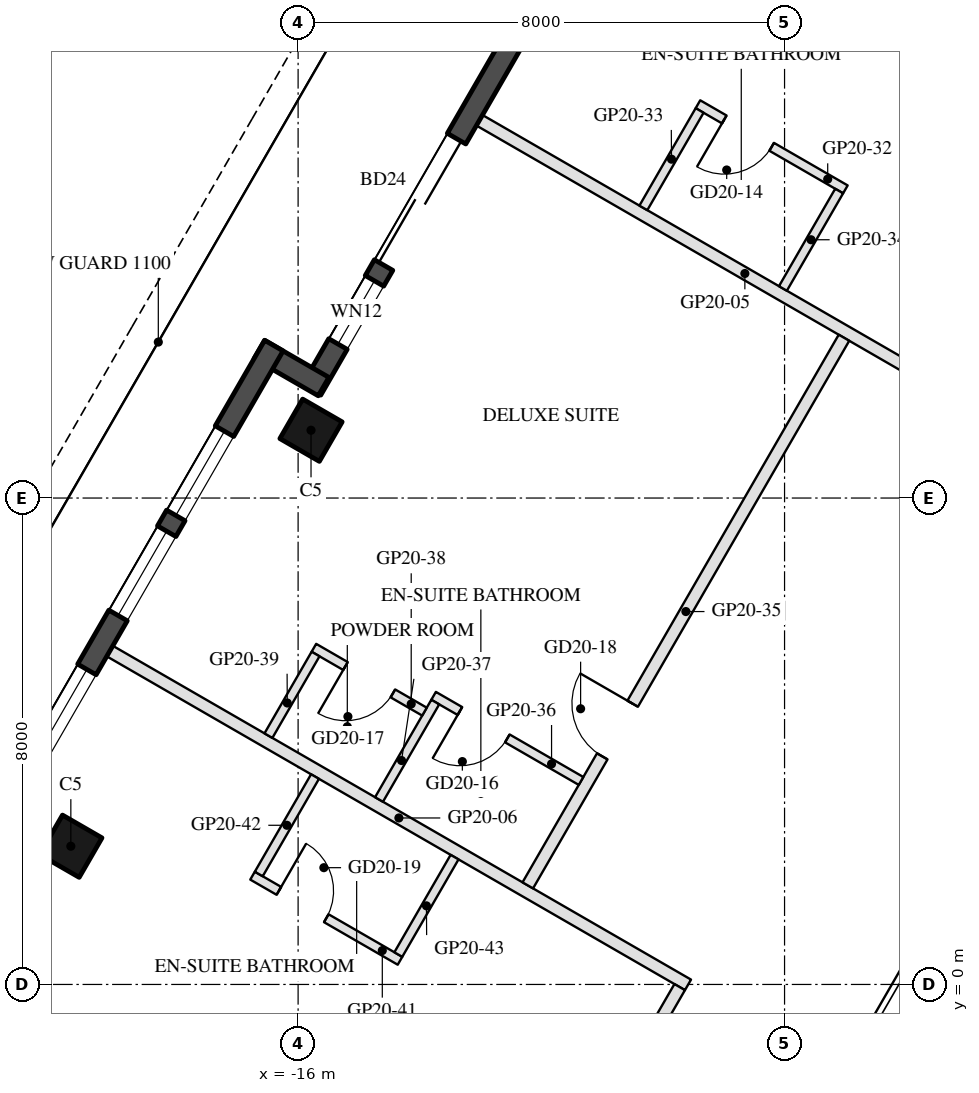
"""IFC4 building model, lengths in metres.
Left out: names, types, materials, properties, quantities, classifications, styles, units other than length and angle.
Written with IfcOpenShell. Run it as: python <this file> out.ifc"""

import sys

from ifc_helpers import new_model, si_unit, direction, frame, frame_2d, origin, origin_2d, place, context, subcontext, project, spatial, rectangle, hollow_rectangle, extrude, element, fill, save


model = new_model("IFC4")
c1 = context("Model", 3, precision=1e-05, world=origin(), true_north=direction((0.0, 1.0)))
c2 = subcontext(c1, "Body", "Model", "MODEL_VIEW")
j1 = project(units=[si_unit("LENGTHUNIT", "METRE"), si_unit("PLANEANGLEUNIT", "RADIAN")], contexts=[c1])
p1 = place(None, origin())
s1 = spatial("IfcSite", under=j1, at=p1, CompositionType="ELEMENT")
p2 = place(p1, origin())
s2 = spatial("IfcBuilding", under=s1, at=p2, CompositionType="ELEMENT")
p3 = place(p2, frame((0.0, 0.0, 213.2)))
s3 = spatial("IfcBuildingStorey", under=s2, at=p3, CompositionType="ELEMENT", Elevation=213.2)
for number, where, z_axis, x_axis in (
    (1, (-15.788, 9.115, 0.0), (0.0, 0.0, 1.0), (0.5, 0.866, 0.0)),
    (2, (-19.738, 2.273, 0.0), (0.0, 0.0, 1.0), (0.5, 0.866, 0.0)),
):
    element("IfcColumn", number, at=place(p3, frame(where, z_axis=z_axis, x_axis=x_axis)), inside=s3, PredefinedType="COLUMN", context=c2, shape_type="SweptSolid", body=[
        extrude(hollow_rectangle(XDim=0.75, YDim=0.75, WallThickness=0.035, at=origin_2d()), origin(), (0.0, 0.0, 1.0), 3.7),
    ])
p4 = place(p3, frame((-13.413, 16.029, 0.0), z_axis=(0.0, 0.0, 1.0), x_axis=(0.866005645448, -0.500034220881, 0.0)))
e3 = element("IfcWall", 3, at=p4, inside=s3, PredefinedType="SOLIDWALL", context=c2, shape_type="SweptSolid", body=[
    extrude(rectangle(XDim=1.22, YDim=0.35, at=frame_2d((0.61, 0.0))), origin(), (0.0, 0.0, 1.0), 3.55),
])
p5 = place(p3, frame((-12.409, 15.617, 0.0), z_axis=(0.0, 0.0, 1.0), x_axis=(-0.500003597184, -0.866023326939, 0.0)))
e4 = element("IfcWall", 4, at=p5, inside=s3, PredefinedType="SOLIDWALL", context=c2, shape_type="SweptSolid", body=[
    extrude(rectangle(XDim=6.74, YDim=0.35, at=frame_2d((3.37, 0.0))), origin(), (0.0, 0.0, 1.0), 3.55),
])
p6 = place(p5, frame((1.97, 0.0, 0.0)))
e5 = element("IfcOpeningElement", 5, at=p6, cuts=e4, PredefinedType="OPENING", context=c2, shape_type="SweptSolid", body=[
    extrude(rectangle(XDim=2.4, YDim=2.4, at=frame_2d((1.2, 1.2))), frame((0.0, 0.185, 0.0), z_axis=(0.0, -1.0, 0.0), x_axis=(1.0, 0.0, 0.0)), (0.0, 0.0, 1.0), 0.37),
])
p7 = place(p5, frame((4.67, 0.0, 0.3)))
e6 = element("IfcOpeningElement", 6, at=p7, cuts=e4, PredefinedType="OPENING", context=c2, shape_type="SweptSolid", body=[
    extrude(rectangle(XDim=1.2, YDim=2.65, at=frame_2d((0.6, 1.325))), frame((0.0, 0.185, 0.0), z_axis=(0.0, -1.0, 0.0), x_axis=(1.0, 0.0, 0.0)), (0.0, 0.0, 1.0), 0.37),
])
p8 = place(p3, frame((-15.581, 9.833, 0.0), z_axis=(0.0, 0.0, 1.0), x_axis=(-0.866055662726, 0.499947586314, 0.0)))
e7 = element("IfcWall", 7, at=p8, inside=s3, PredefinedType="SOLIDWALL", context=c2, shape_type="SweptSolid", body=[
    extrude(rectangle(XDim=1.22, YDim=0.35, at=frame_2d((0.61, 0.0))), origin(), (0.0, 0.0, 1.0), 3.55),
])
p9 = place(p3, frame((-16.398, 10.507, 0.0), z_axis=(0.0, 0.0, 1.0), x_axis=(-0.499999142773, -0.866025898704, 0.0)))
e8 = element("IfcWall", 8, at=p9, inside=s3, PredefinedType="SOLIDWALL", context=c2, shape_type="SweptSolid", body=[
    extrude(rectangle(XDim=9.7, YDim=0.35, at=frame_2d((4.85, 0.0))), origin(), (0.0, 0.0, 1.0), 3.55),
])
p10 = place(p9, frame((1.625, 0.0, 0.3)))
e9 = element("IfcOpeningElement", 9, at=p10, cuts=e8, PredefinedType="OPENING", context=c2, shape_type="SweptSolid", body=[
    extrude(rectangle(XDim=1.6, YDim=2.65, at=frame_2d((0.8, 1.325))), frame((0.0, 0.185, 0.0), z_axis=(0.0, -1.0, 0.0), x_axis=(1.0, 0.0, 0.0)), (0.0, 0.0, 1.0), 0.37),
])
p11 = place(p9, frame((3.525, 0.0, 0.3)))
e10 = element("IfcOpeningElement", 10, at=p11, cuts=e8, PredefinedType="OPENING", context=c2, shape_type="SweptSolid", body=[
    extrude(rectangle(XDim=1.6, YDim=2.65, at=frame_2d((0.8, 1.325))), frame((0.0, 0.185, 0.0), z_axis=(0.0, -1.0, 0.0), x_axis=(1.0, 0.0, 0.0)), (0.0, 0.0, 1.0), 0.37),
])
p12 = place(p9, frame((6.15, 0.0, 0.3)))
e11 = element("IfcOpeningElement", 11, at=p12, cuts=e8, PredefinedType="OPENING", context=c2, shape_type="SweptSolid", body=[
    extrude(rectangle(XDim=1.9, YDim=2.65, at=frame_2d((0.95, 1.325))), frame((0.0, 0.185, 0.0), z_axis=(0.0, -1.0, 0.0), x_axis=(1.0, 0.0, 0.0)), (0.0, 0.0, 1.0), 0.37),
])
p13 = place(p3, frame((-13.018, 14.213, 0.0), z_axis=(0.0, 0.0, 1.0), x_axis=(0.866022637375, -0.500004791531, 0.0)))
e12 = element("IfcWall", 12, at=p13, inside=s3, PredefinedType="PARTITIONING", context=c2, shape_type="SweptSolid", body=[
    extrude(rectangle(XDim=10.08, YDim=0.2, at=frame_2d((5.04, 0.0))), origin(), (0.0, 0.0, 1.0), 3.06),
])
p14 = place(p3, frame((-19.097, 5.483, 0.0), z_axis=(0.0, 0.0, 1.0), x_axis=(0.866027479907, -0.499996404033, 0.0)))
e13 = element("IfcWall", 13, at=p14, inside=s3, PredefinedType="PARTITIONING", context=c2, shape_type="SweptSolid", body=[
    extrude(rectangle(XDim=10.98, YDim=0.2, at=frame_2d((5.49, 0.0))), origin(), (0.0, 0.0, 1.0), 3.06),
])
p15 = place(p3, frame((-7.0, 13.077, 0.0), z_axis=(0.0, 0.0, 1.0), x_axis=(-0.866034573852, 0.49998411664, 0.0)))
e14 = element("IfcWall", 14, at=p15, inside=s3, PredefinedType="PARTITIONING", context=c2, shape_type="SweptSolid", body=[
    extrude(rectangle(XDim=2.8, YDim=0.15, at=frame_2d((1.4, 0.0))), origin(), (0.0, 0.0, 1.0), 2.95),
])
p16 = place(p15, frame((1.4, 0.0, 0.0)))
e15 = element("IfcOpeningElement", 15, at=p16, cuts=e14, PredefinedType="OPENING", context=c2, shape_type="SweptSolid", body=[
    extrude(rectangle(XDim=0.9, YDim=2.1, at=frame_2d((0.45, 1.05))), frame((0.0, 0.085, 0.0), z_axis=(0.0, -1.0, 0.0), x_axis=(1.0, 0.0, 0.0)), (0.0, 0.0, 1.0), 0.17),
])
for number, where, z_axis, x_axis in (
    (16, (-9.397, 14.374, 0.0), (0.0, 0.0, 1.0), (-0.5, -0.866, 0.0)),
    (17, (-7.102, 13.049, 0.0), (0.0, 0.0, 1.0), (-0.5, -0.866, 0.0)),
):
    element("IfcWall", number, at=place(p3, frame(where, z_axis=z_axis, x_axis=x_axis)), inside=s3, PredefinedType="PARTITIONING", context=c2, shape_type="SweptSolid", body=[
        extrude(rectangle(XDim=1.85, YDim=0.15, at=frame_2d((0.925, 0.0))), origin(), (0.0, 0.0, 1.0), 3.55),
    ])
p17 = place(p3, frame((-12.223, 1.63, 0.0), z_axis=(0.0, 0.0, 1.0), x_axis=(0.499999493275, 0.866025696342, 0.0)))
e18 = element("IfcWall", 18, at=p17, inside=s3, PredefinedType="PARTITIONING", context=c2, shape_type="SweptSolid", body=[
    extrude(rectangle(XDim=10.4, YDim=0.2, at=frame_2d((5.2, 0.0))), origin(), (0.0, 0.0, 1.0), 2.95),
])
p18 = place(p17, frame((2.45, 0.0, 0.0)))
e19 = element("IfcOpeningElement", 19, at=p18, cuts=e18, PredefinedType="OPENING", context=c2, shape_type="SweptSolid", body=[
    extrude(rectangle(XDim=1.0, YDim=2.1, at=frame_2d((0.5, 1.05))), frame((0.0, 0.11, 0.0), z_axis=(0.0, -1.0, 0.0), x_axis=(1.0, 0.0, 0.0)), (0.0, 0.0, 1.0), 0.22),
])
p19 = place(p3, frame((-11.347, 3.347, 0.0), z_axis=(0.0, 0.0, 1.0), x_axis=(-0.866018616679, 0.500011755427, 0.0)))
e20 = element("IfcWall", 20, at=p19, inside=s3, PredefinedType="PARTITIONING", context=c2, shape_type="SweptSolid", body=[
    extrude(rectangle(XDim=2.8, YDim=0.15, at=frame_2d((1.4, 0.0))), origin(), (0.0, 0.0, 1.0), 3.55),
])
p20 = place(p19, frame((1.4, 0.0, 0.0)))
e21 = element("IfcOpeningElement", 21, at=p20, cuts=e20, PredefinedType="OPENING", context=c2, shape_type="SweptSolid", body=[
    extrude(rectangle(XDim=0.9, YDim=2.1, at=frame_2d((0.45, 1.05))), frame((0.0, 0.085, 0.0), z_axis=(0.0, -1.0, 0.0), x_axis=(1.0, 0.0, 0.0)), (0.0, 0.0, 1.0), 0.17),
])
p21 = place(p3, frame((-13.744, 4.644, 0.0), z_axis=(0.0, 0.0, 1.0), x_axis=(-0.500042316284, -0.866000971088, 0.0)))
e22 = element("IfcWall", 22, at=p21, inside=s3, PredefinedType="PARTITIONING", context=c2, shape_type="SweptSolid", body=[
    extrude(rectangle(XDim=1.85, YDim=0.15, at=frame_2d((0.925, 0.0))), origin(), (0.0, 0.0, 1.0), 2.95),
])
p22 = place(p3, frame((-13.922, 4.487, 0.0), z_axis=(0.0, 0.0, 1.0), x_axis=(-0.866009402589, 0.500027713859, 0.0)))
e23 = element("IfcWall", 23, at=p22, inside=s3, PredefinedType="PARTITIONING", context=c2, shape_type="SweptSolid", body=[
    extrude(rectangle(XDim=2.1, YDim=0.15, at=frame_2d((1.05, 0.0))), origin(), (0.0, 0.0, 1.0), 3.55),
])
p23 = place(p22, frame((0.6, 0.0, 0.0)))
e24 = element("IfcOpeningElement", 24, at=p23, cuts=e23, PredefinedType="OPENING", context=c2, shape_type="SweptSolid", body=[
    extrude(rectangle(XDim=0.9, YDim=2.1, at=frame_2d((0.45, 1.05))), frame((0.0, 0.085, 0.0), z_axis=(0.0, -1.0, 0.0), x_axis=(1.0, 0.0, 0.0)), (0.0, 0.0, 1.0), 0.17),
])
p24 = place(p3, frame((-15.713, 5.435, 0.0), z_axis=(0.0, 0.0, 1.0), x_axis=(-0.499967891604, -0.866043940782, 0.0)))
e25 = element("IfcWall", 25, at=p24, inside=s3, PredefinedType="PARTITIONING", context=c2, shape_type="SweptSolid", body=[
    extrude(rectangle(XDim=1.55, YDim=0.15, at=frame_2d((0.775, 0.0))), origin(), (0.0, 0.0, 1.0), 2.95),
])
p25 = place(p3, frame((-12.269, -4.45, 0.0), z_axis=(0.0, 0.0, 1.0), x_axis=(0.500014573982, 0.866016989329, 0.0)))
e26 = element("IfcWall", 26, at=p25, inside=s3, PredefinedType="PARTITIONING", context=c2, shape_type="SweptSolid", body=[
    extrude(rectangle(XDim=5.088, YDim=0.2, at=frame_2d((2.544, 0.0))), origin(), (0.0, 0.0, 1.0), 2.95),
])
p26 = place(p25, frame((2.044, 0.0, 0.0)))
e27 = element("IfcOpeningElement", 27, at=p26, cuts=e26, PredefinedType="OPENING", context=c2, shape_type="SweptSolid", body=[
    extrude(rectangle(XDim=1.0, YDim=2.1, at=frame_2d((0.5, 1.05))), frame((0.0, 0.11, 0.0), z_axis=(0.0, -1.0, 0.0), x_axis=(1.0, 0.0, 0.0)), (0.0, 0.0, 1.0), 0.22),
])
p27 = place(p3, frame((-16.749, 1.789, 0.0), z_axis=(0.0, 0.0, 1.0), x_axis=(0.866034573852, -0.49998411664, 0.0)))
e28 = element("IfcWall", 28, at=p27, inside=s3, PredefinedType="PARTITIONING", context=c2, shape_type="SweptSolid", body=[
    extrude(rectangle(XDim=2.8, YDim=0.15, at=frame_2d((1.4, 0.0))), origin(), (0.0, 0.0, 1.0), 3.55),
])
p28 = place(p27, frame((0.5, 0.0, 0.0)))
e29 = element("IfcOpeningElement", 29, at=p28, cuts=e28, PredefinedType="OPENING", context=c2, shape_type="SweptSolid", body=[
    extrude(rectangle(XDim=0.9, YDim=2.1, at=frame_2d((0.45, 1.05))), frame((0.0, 0.085, 0.0), z_axis=(0.0, -1.0, 0.0), x_axis=(1.0, 0.0, 0.0)), (0.0, 0.0, 1.0), 0.17),
])
p29 = place(p3, frame((-15.722, 3.419, 0.0), z_axis=(0.0, 0.0, 1.0), x_axis=(-0.500042316284, -0.866000971088, 0.0)))
e30 = element("IfcWall", 30, at=p29, inside=s3, PredefinedType="PARTITIONING", context=c2, shape_type="SweptSolid", body=[
    extrude(rectangle(XDim=1.85, YDim=0.15, at=frame_2d((0.925, 0.0))), origin(), (0.0, 0.0, 1.0), 3.55),
])
p30 = place(p3, frame((-13.427, 2.094, 0.0), z_axis=(0.0, 0.0, 1.0), x_axis=(-0.499886193382, -0.866091100096, 0.0)))
e31 = element("IfcWall", 31, at=p30, inside=s3, PredefinedType="PARTITIONING", context=c2, shape_type="SweptSolid", body=[
    extrude(rectangle(XDim=1.85, YDim=0.15, at=frame_2d((0.925, 0.0))), origin(), (0.0, 0.0, 1.0), 3.55),
])
p31 = place(p6, frame((2.4, 0.0, 0.0), z_axis=(0.0, 0.0, 1.0), x_axis=(-1.0, 0.0, 0.0)))
e32 = element("IfcDoor", 32, at=p31, inside=s3, OperationType="SLIDING_TO_LEFT", PredefinedType="DOOR", context=c2, shape_type="SweptSolid", body=[
    extrude(rectangle(XDim=2.4, YDim=2.4, at=frame_2d((1.2, 1.2))), frame((0.0, 0.025, 0.0), z_axis=(0.0, -1.0, 0.0), x_axis=(1.0, 0.0, 0.0)), (0.0, 0.0, 1.0), 0.05),
])
fill(e5, e32)
p32 = place(p7, origin())
e33 = element("IfcWindow", 33, at=p32, inside=s3, PartitioningType="SINGLE_PANEL", PredefinedType="WINDOW", context=c2, shape_type="SweptSolid", body=[
    extrude(rectangle(XDim=1.2, YDim=2.65, at=frame_2d((0.6, 1.325))), frame((0.0, 0.03, 0.0), z_axis=(0.0, -1.0, 0.0), x_axis=(1.0, 0.0, 0.0)), (0.0, 0.0, 1.0), 0.06),
])
fill(e6, e33)
p33 = place(p10, origin())
e34 = element("IfcWindow", 34, at=p33, inside=s3, PartitioningType="SINGLE_PANEL", PredefinedType="WINDOW", context=c2, shape_type="SweptSolid", body=[
    extrude(rectangle(XDim=1.6, YDim=2.65, at=frame_2d((0.8, 1.325))), frame((0.0, 0.03, 0.0), z_axis=(0.0, -1.0, 0.0), x_axis=(1.0, 0.0, 0.0)), (0.0, 0.0, 1.0), 0.06),
])
fill(e9, e34)
p34 = place(p11, origin())
e35 = element("IfcWindow", 35, at=p34, inside=s3, PartitioningType="SINGLE_PANEL", PredefinedType="WINDOW", context=c2, shape_type="SweptSolid", body=[
    extrude(rectangle(XDim=1.6, YDim=2.65, at=frame_2d((0.8, 1.325))), frame((0.0, 0.03, 0.0), z_axis=(0.0, -1.0, 0.0), x_axis=(1.0, 0.0, 0.0)), (0.0, 0.0, 1.0), 0.06),
])
fill(e10, e35)
p35 = place(p12, origin())
e36 = element("IfcWindow", 36, at=p35, inside=s3, PartitioningType="SINGLE_PANEL", PredefinedType="WINDOW", context=c2, shape_type="SweptSolid", body=[
    extrude(rectangle(XDim=1.9, YDim=2.65, at=frame_2d((0.95, 1.325))), frame((0.0, 0.03, 0.0), z_axis=(0.0, -1.0, 0.0), x_axis=(1.0, 0.0, 0.0)), (0.0, 0.0, 1.0), 0.06),
])
fill(e11, e36)
p36 = place(p16, origin())
e37 = element("IfcDoor", 37, at=p36, inside=s3, OperationType="SINGLE_SWING_RIGHT", PredefinedType="DOOR", context=c2, shape_type="SweptSolid", body=[
    extrude(rectangle(XDim=0.9, YDim=2.1, at=frame_2d((0.45, 1.05))), frame((0.0, 0.025, 0.0), z_axis=(0.0, -1.0, 0.0), x_axis=(1.0, 0.0, 0.0)), (0.0, 0.0, 1.0), 0.05),
])
fill(e15, e37)
p37 = place(p20, origin())
e38 = element("IfcDoor", 38, at=p37, inside=s3, OperationType="SINGLE_SWING_RIGHT", PredefinedType="DOOR", context=c2, shape_type="SweptSolid", body=[
    extrude(rectangle(XDim=0.9, YDim=2.1, at=frame_2d((0.45, 1.05))), frame((0.0, 0.025, 0.0), z_axis=(0.0, -1.0, 0.0), x_axis=(1.0, 0.0, 0.0)), (0.0, 0.0, 1.0), 0.05),
])
fill(e21, e38)
p38 = place(p23, origin())
e39 = element("IfcDoor", 39, at=p38, inside=s3, OperationType="SINGLE_SWING_RIGHT", PredefinedType="DOOR", context=c2, shape_type="SweptSolid", body=[
    extrude(rectangle(XDim=0.9, YDim=2.1, at=frame_2d((0.45, 1.05))), frame((0.0, 0.025, 0.0), z_axis=(0.0, -1.0, 0.0), x_axis=(1.0, 0.0, 0.0)), (0.0, 0.0, 1.0), 0.05),
])
fill(e24, e39)
p39 = place(p18, origin())
e40 = element("IfcDoor", 40, at=p39, inside=s3, OperationType="SINGLE_SWING_RIGHT", PredefinedType="DOOR", context=c2, shape_type="SweptSolid", body=[
    extrude(rectangle(XDim=1.0, YDim=2.1, at=frame_2d((0.5, 1.05))), frame((0.0, 0.025, 0.0), z_axis=(0.0, -1.0, 0.0), x_axis=(1.0, 0.0, 0.0)), (0.0, 0.0, 1.0), 0.05),
])
fill(e19, e40)
p40 = place(p28, origin())
e41 = element("IfcDoor", 41, at=p40, inside=s3, OperationType="SINGLE_SWING_LEFT", PredefinedType="DOOR", context=c2, shape_type="SweptSolid", body=[
    extrude(rectangle(XDim=0.9, YDim=2.1, at=frame_2d((0.45, 1.05))), frame((0.0, 0.025, 0.0), z_axis=(0.0, -1.0, 0.0), x_axis=(1.0, 0.0, 0.0)), (0.0, 0.0, 1.0), 0.05),
])
fill(e29, e41)
save(model, sys.argv[1])
